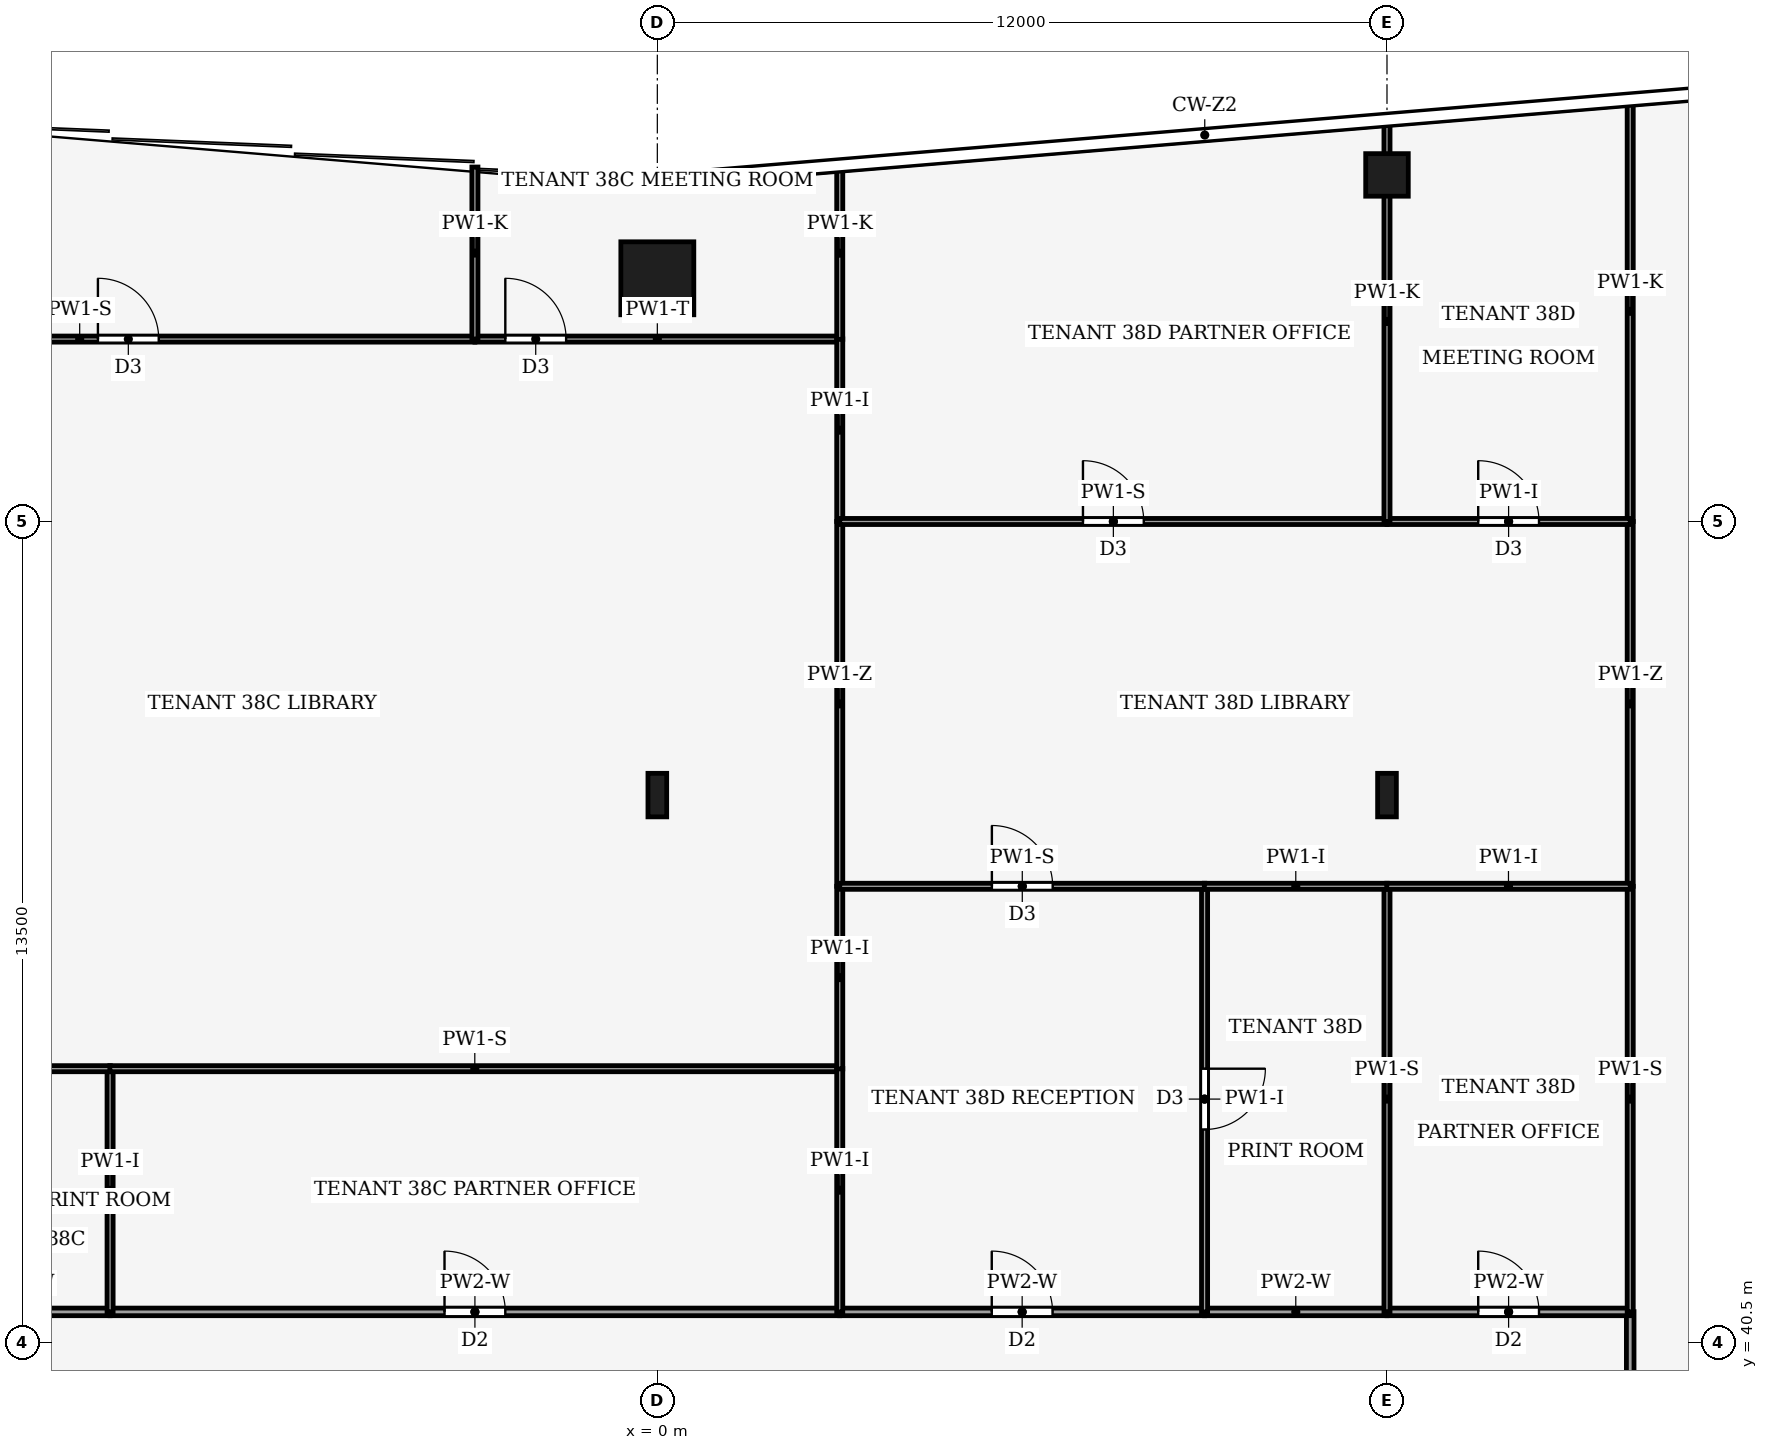
"""IFC4 building model, lengths in metres.
Left out: names, types, materials, properties, quantities, classifications, styles, units other than length and angle.
Written with IfcOpenShell. Run it as: python <this file> out.ifc"""

import sys

from ifc_helpers import new_model, si_unit, direction, frame, frame_2d, origin, origin_2d, place, context, subcontext, project, spatial, rectangle, hollow_rectangle, i_section, extrude, element, fill, save


model = new_model("IFC4")
c1 = context("Model", 3, precision=1e-05, world=origin(), true_north=direction((0.0, 1.0)))
c2 = subcontext(c1, "Body", "Model", "MODEL_VIEW")
j1 = project(units=[si_unit("LENGTHUNIT", "METRE"), si_unit("PLANEANGLEUNIT", "RADIAN")], contexts=[c1])
p1 = place(None, origin())
s1 = spatial("IfcSite", under=j1, at=p1, CompositionType="ELEMENT")
p2 = place(p1, origin())
s2 = spatial("IfcBuilding", under=s1, at=p2, CompositionType="ELEMENT")
p3 = place(p2, frame((0.0, 0.0, 166.0)))
s3 = spatial("IfcBuildingStorey", under=s2, at=p3, CompositionType="ELEMENT", Elevation=166.0)
p4 = place(p3, frame((0.0, 58.0, 0.0), z_axis=(0.0, 0.0, 1.0), x_axis=(1.0, 0.0, 0.0)))
e1 = element("IfcColumn", 1, at=p4, inside=s3, PredefinedType="COLUMN", context=c2, shape_type="SweptSolid", body=[
    extrude(hollow_rectangle(XDim=1.2, YDim=1.2, WallThickness=0.07, at=origin_2d()), origin(), (0.0, 0.0, 1.0), 4.0),
])
p5 = place(p3, frame((12.0, 59.7, 0.0), z_axis=(0.0, 0.0, 1.0), x_axis=(1.0, 0.0, 0.0)))
e2 = element("IfcColumn", 2, at=p5, inside=s3, PredefinedType="COLUMN", context=c2, shape_type="SweptSolid", body=[
    extrude(hollow_rectangle(XDim=0.7, YDim=0.7, WallThickness=0.03, at=origin_2d()), origin(), (0.0, 0.0, 1.0), 4.0),
])
for number, where, z_axis, x_axis in (
    (3, (0.0, 49.5, 0.0), (0.0, 0.0, 1.0), (1.0, 0.0, 0.0)),
    (4, (12.0, 49.5, 0.0), (0.0, 0.0, 1.0), (1.0, 0.0, 0.0)),
):
    element("IfcColumn", number, at=place(p3, frame(where, z_axis=z_axis, x_axis=x_axis)), inside=s3, PredefinedType="COLUMN", context=c2, shape_type="SweptSolid", body=[
        extrude(i_section(OverallWidth=0.308, OverallDepth=0.716, WebThickness=0.021, FlangeThickness=0.04, FilletRadius=0.027, at=origin_2d()), origin(), (0.0, 0.0, 1.0), 4.0),
    ])
p6 = place(p3, frame((16.0, 41.004, 0.0), z_axis=(0.0, 0.0, 1.0), x_axis=(0.0, -1.0, 0.0)))
e5 = element("IfcWall", 5, at=p6, inside=s3, PredefinedType="PARTITIONING", context=c2, shape_type="SweptSolid", body=[
    extrude(rectangle(XDim=11.004, YDim=0.125, at=frame_2d((5.502, 0.0))), origin(), (0.0, 0.0, 1.0), 3.02),
])
p7 = place(p6, frame((5.002, 0.0, 0.0)))
e6 = element("IfcOpeningElement", 6, at=p7, cuts=e5, PredefinedType="OPENING", context=c2, shape_type="SweptSolid", body=[
    extrude(rectangle(XDim=1.0, YDim=2.1, at=frame_2d((0.5, 1.05))), frame((0.0, 0.073, 0.0), z_axis=(0.0, -1.0, 0.0), x_axis=(1.0, 0.0, 0.0)), (0.0, 0.0, 1.0), 0.145),
])
p8 = place(p3, frame((-9.0, 41.0, 0.0), z_axis=(0.0, 0.0, 1.0), x_axis=(-1.0, 0.0, 0.0)))
e7 = element("IfcWall", 7, at=p8, inside=s3, PredefinedType="PARTITIONING", context=c2, shape_type="SweptSolid", body=[
    extrude(rectangle(XDim=3.0, YDim=0.125, at=frame_2d((1.5, 0.0))), origin(), (0.0, 0.0, 1.0), 3.32),
])
p9 = place(p3, frame((-9.0, 41.0, 0.0), z_axis=(0.0, 0.0, 1.0), x_axis=(1.0, 0.0, 0.0)))
e8 = element("IfcWall", 8, at=p9, inside=s3, PredefinedType="PARTITIONING", context=c2, shape_type="SweptSolid", body=[
    extrude(rectangle(XDim=12.0, YDim=0.125, at=frame_2d((6.0, 0.0))), origin(), (0.0, 0.0, 1.0), 3.32),
])
p10 = place(p9, frame((5.5, 0.0, 0.0)))
e9 = element("IfcOpeningElement", 9, at=p10, cuts=e8, PredefinedType="OPENING", context=c2, shape_type="SweptSolid", body=[
    extrude(rectangle(XDim=1.0, YDim=2.1, at=frame_2d((0.5, 1.05))), frame((0.0, 0.073, 0.0), z_axis=(0.0, -1.0, 0.0), x_axis=(1.0, 0.0, 0.0)), (0.0, 0.0, 1.0), 0.145),
])
p11 = place(p3, frame((3.0, 41.0, 0.0), z_axis=(0.0, 0.0, 1.0), x_axis=(1.0, 0.0, 0.0)))
e10 = element("IfcWall", 10, at=p11, inside=s3, PredefinedType="PARTITIONING", context=c2, shape_type="SweptSolid", body=[
    extrude(rectangle(XDim=6.0, YDim=0.125, at=frame_2d((3.0, 0.0))), origin(), (0.0, 0.0, 1.0), 3.32),
])
p12 = place(p11, frame((2.5, 0.0, 0.0)))
e11 = element("IfcOpeningElement", 11, at=p12, cuts=e10, PredefinedType="OPENING", context=c2, shape_type="SweptSolid", body=[
    extrude(rectangle(XDim=1.0, YDim=2.1, at=frame_2d((0.5, 1.05))), frame((0.0, 0.073, 0.0), z_axis=(0.0, -1.0, 0.0), x_axis=(1.0, 0.0, 0.0)), (0.0, 0.0, 1.0), 0.145),
])
p13 = place(p3, frame((12.0, 41.0, 0.0), z_axis=(0.0, 0.0, 1.0), x_axis=(-1.0, 0.0, 0.0)))
e12 = element("IfcWall", 12, at=p13, inside=s3, PredefinedType="PARTITIONING", context=c2, shape_type="SweptSolid", body=[
    extrude(rectangle(XDim=3.0, YDim=0.125, at=frame_2d((1.5, 0.0))), origin(), (0.0, 0.0, 1.0), 3.32),
])
p14 = place(p3, frame((12.0, 41.0, 0.0), z_axis=(0.0, 0.0, 1.0), x_axis=(1.0, 0.0, 0.0)))
e13 = element("IfcWall", 13, at=p14, inside=s3, PredefinedType="PARTITIONING", context=c2, shape_type="SweptSolid", body=[
    extrude(rectangle(XDim=4.0, YDim=0.125, at=frame_2d((2.0, 0.0))), origin(), (0.0, 0.0, 1.0), 3.32),
])
p15 = place(p14, frame((1.5, 0.0, 0.0)))
e14 = element("IfcOpeningElement", 14, at=p15, cuts=e13, PredefinedType="OPENING", context=c2, shape_type="SweptSolid", body=[
    extrude(rectangle(XDim=1.0, YDim=2.1, at=frame_2d((0.5, 1.05))), frame((0.0, 0.073, 0.0), z_axis=(0.0, -1.0, 0.0), x_axis=(1.0, 0.0, 0.0)), (0.0, 0.0, 1.0), 0.145),
])
p16 = place(p3, frame((16.0, 48.0, 0.0), z_axis=(0.0, 0.0, 1.0), x_axis=(0.0, -1.0, 0.0)))
e15 = element("IfcWall", 15, at=p16, inside=s3, PredefinedType="PARTITIONING", context=c2, shape_type="SweptSolid", body=[
    extrude(rectangle(XDim=7.0, YDim=0.1, at=frame_2d((3.5, 0.0))), origin(), (0.0, 0.0, 1.0), 3.32),
])
p17 = place(p3, frame((16.0, 54.0, 0.0), z_axis=(0.0, 0.0, 1.0), x_axis=(0.0, -1.0, 0.0)))
e16 = element("IfcWall", 16, at=p17, inside=s3, PredefinedType="PARTITIONING", context=c2, shape_type="SweptSolid", body=[
    extrude(rectangle(XDim=6.0, YDim=0.1, at=frame_2d((3.0, 0.0))), origin(), (0.0, 0.0, 1.0), 3.12),
])
p18 = place(p3, frame((16.0, 60.913, 0.0), z_axis=(0.0, 0.0, 1.0), x_axis=(0.0, -1.0, 0.0)))
e17 = element("IfcWall", 17, at=p18, inside=s3, PredefinedType="PARTITIONING", context=c2, shape_type="SweptSolid", body=[
    extrude(rectangle(XDim=6.913, YDim=0.1, at=frame_2d((3.457, 0.0))), origin(), (0.0, 0.0, 1.0), 2.92),
])
p19 = place(p3, frame((-9.0, 41.0, 0.0), z_axis=(0.0, 0.0, 1.0), x_axis=(0.0, 1.0, 0.0)))
e18 = element("IfcWall", 18, at=p19, inside=s3, PredefinedType="PARTITIONING", context=c2, shape_type="SweptSolid", body=[
    extrude(rectangle(XDim=4.0, YDim=0.1, at=frame_2d((2.0, 0.0))), origin(), (0.0, 0.0, 1.0), 3.75),
])
p20 = place(p3, frame((-8.996, 45.0, 0.0), z_axis=(0.0, 0.0, 1.0), x_axis=(-1.0, 0.0, 0.0)))
e19 = element("IfcWall", 19, at=p20, inside=s3, PredefinedType="PARTITIONING", context=c2, shape_type="SweptSolid", body=[
    extrude(rectangle(XDim=3.008, YDim=0.1, at=frame_2d((1.504, 0.0))), origin(), (0.0, 0.0, 1.0), 3.75),
])
p21 = place(p3, frame((3.0, 45.0, 0.0), z_axis=(0.0, 0.0, 1.0), x_axis=(-1.0, 0.0, 0.0)))
e20 = element("IfcWall", 20, at=p21, inside=s3, PredefinedType="PARTITIONING", context=c2, shape_type="SweptSolid", body=[
    extrude(rectangle(XDim=12.004, YDim=0.1, at=frame_2d((6.002, 0.0))), origin(), (0.0, 0.0, 1.0), 3.32),
])
p22 = place(p3, frame((3.0, 41.0, 0.0), z_axis=(0.0, 0.0, 1.0), x_axis=(0.0, 1.0, 0.0)))
e21 = element("IfcWall", 21, at=p22, inside=s3, PredefinedType="PARTITIONING", context=c2, shape_type="SweptSolid", body=[
    extrude(rectangle(XDim=4.004, YDim=0.1, at=frame_2d((2.002, 0.0))), origin(), (0.0, 0.0, 1.0), 3.75),
])
p23 = place(p3, frame((-16.0, 57.0, 0.0), z_axis=(0.0, 0.0, 1.0), x_axis=(1.0, 0.0, 0.0)))
e22 = element("IfcWall", 22, at=p23, inside=s3, PredefinedType="PARTITIONING", context=c2, shape_type="SweptSolid", body=[
    extrude(rectangle(XDim=13.0, YDim=0.1, at=frame_2d((6.5, 0.0))), origin(), (0.0, 0.0, 1.0), 3.32),
])
p24 = place(p23, frame((6.8, 0.0, 0.0)))
e23 = element("IfcOpeningElement", 23, at=p24, cuts=e22, PredefinedType="OPENING", context=c2, shape_type="SweptSolid", body=[
    extrude(rectangle(XDim=1.0, YDim=2.1, at=frame_2d((0.5, 1.05))), frame((0.0, 0.06, 0.0), z_axis=(0.0, -1.0, 0.0), x_axis=(1.0, 0.0, 0.0)), (0.0, 0.0, 1.0), 0.12),
])
p25 = place(p3, frame((-3.0, 57.0, 0.0), z_axis=(0.0, 0.0, 1.0), x_axis=(1.0, 0.0, 0.0)))
e24 = element("IfcWall", 24, at=p25, inside=s3, PredefinedType="PARTITIONING", context=c2, shape_type="SweptSolid", body=[
    extrude(rectangle(XDim=6.0, YDim=0.1, at=frame_2d((3.0, 0.0))), origin(), (0.0, 0.0, 1.0), 3.36),
])
p26 = place(p25, frame((0.5, 0.0, 0.0)))
e25 = element("IfcOpeningElement", 25, at=p26, cuts=e24, PredefinedType="OPENING", context=c2, shape_type="SweptSolid", body=[
    extrude(rectangle(XDim=1.0, YDim=2.1, at=frame_2d((0.5, 1.05))), frame((0.0, 0.06, 0.0), z_axis=(0.0, -1.0, 0.0), x_axis=(1.0, 0.0, 0.0)), (0.0, 0.0, 1.0), 0.12),
])
p27 = place(p3, frame((3.0, 44.996, 0.0), z_axis=(0.0, 0.0, 1.0), x_axis=(0.0, 1.0, 0.0)))
e26 = element("IfcWall", 26, at=p27, inside=s3, PredefinedType="PARTITIONING", context=c2, shape_type="SweptSolid", body=[
    extrude(rectangle(XDim=3.004, YDim=0.1, at=frame_2d((1.502, 0.0))), origin(), (0.0, 0.0, 1.0), 3.75),
])
p28 = place(p3, frame((3.0, 48.0, 0.0), z_axis=(0.0, 0.0, 1.0), x_axis=(0.0, 1.0, 0.0)))
e27 = element("IfcWall", 27, at=p28, inside=s3, PredefinedType="PARTITIONING", context=c2, shape_type="SweptSolid", body=[
    extrude(rectangle(XDim=6.0, YDim=0.1, at=frame_2d((3.0, 0.0))), origin(), (0.0, 0.0, 1.0), 3.12),
])
p29 = place(p3, frame((3.0, 54.0, 0.0), z_axis=(0.0, 0.0, 1.0), x_axis=(0.0, 1.0, 0.0)))
e28 = element("IfcWall", 28, at=p29, inside=s3, PredefinedType="PARTITIONING", context=c2, shape_type="SweptSolid", body=[
    extrude(rectangle(XDim=3.004, YDim=0.1, at=frame_2d((1.502, 0.0))), origin(), (0.0, 0.0, 1.0), 3.75),
])
p30 = place(p3, frame((-3.0, 57.0, 0.0), z_axis=(0.0, 0.0, 1.0), x_axis=(0.0, 1.0, 0.0)))
e29 = element("IfcWall", 29, at=p30, inside=s3, PredefinedType="PARTITIONING", context=c2, shape_type="SweptSolid", body=[
    extrude(rectangle(XDim=2.83, YDim=0.1, at=frame_2d((1.415, 0.0))), origin(), (0.0, 0.0, 1.0), 2.92),
])
p31 = place(p3, frame((3.0, 56.996, 0.0), z_axis=(0.0, 0.0, 1.0), x_axis=(0.0, 1.0, 0.0)))
e30 = element("IfcWall", 30, at=p31, inside=s3, PredefinedType="PARTITIONING", context=c2, shape_type="SweptSolid", body=[
    extrude(rectangle(XDim=2.834, YDim=0.1, at=frame_2d((1.417, 0.0))), origin(), (0.0, 0.0, 1.0), 2.92),
])
p32 = place(p3, frame((9.0, 48.0, 0.0), z_axis=(0.0, 0.0, 1.0), x_axis=(0.0, -1.0, 0.0)))
e31 = element("IfcWall", 31, at=p32, inside=s3, PredefinedType="PARTITIONING", context=c2, shape_type="SweptSolid", body=[
    extrude(rectangle(XDim=7.0, YDim=0.1, at=frame_2d((3.5, 0.0))), origin(), (0.0, 0.0, 1.0), 3.75),
])
p33 = place(p32, frame((3.0, 0.0, 0.0)))
e32 = element("IfcOpeningElement", 32, at=p33, cuts=e31, PredefinedType="OPENING", context=c2, shape_type="SweptSolid", body=[
    extrude(rectangle(XDim=1.0, YDim=2.1, at=frame_2d((0.5, 1.05))), frame((0.0, 0.06, 0.0), z_axis=(0.0, -1.0, 0.0), x_axis=(1.0, 0.0, 0.0)), (0.0, 0.0, 1.0), 0.12),
])
p34 = place(p3, frame((3.0, 48.0, 0.0), z_axis=(0.0, 0.0, 1.0), x_axis=(1.0, 0.0, 0.0)))
e33 = element("IfcWall", 33, at=p34, inside=s3, PredefinedType="PARTITIONING", context=c2, shape_type="SweptSolid", body=[
    extrude(rectangle(XDim=6.004, YDim=0.1, at=frame_2d((3.002, 0.0))), origin(), (0.0, 0.0, 1.0), 3.32),
])
p35 = place(p34, frame((2.502, 0.0, 0.0)))
e34 = element("IfcOpeningElement", 34, at=p35, cuts=e33, PredefinedType="OPENING", context=c2, shape_type="SweptSolid", body=[
    extrude(rectangle(XDim=1.0, YDim=2.1, at=frame_2d((0.5, 1.05))), frame((0.0, 0.06, 0.0), z_axis=(0.0, -1.0, 0.0), x_axis=(1.0, 0.0, 0.0)), (0.0, 0.0, 1.0), 0.12),
])
p36 = place(p3, frame((12.0, 41.0, 0.0), z_axis=(0.0, 0.0, 1.0), x_axis=(0.0, 1.0, 0.0)))
e35 = element("IfcWall", 35, at=p36, inside=s3, PredefinedType="PARTITIONING", context=c2, shape_type="SweptSolid", body=[
    extrude(rectangle(XDim=7.0, YDim=0.1, at=frame_2d((3.5, 0.0))), origin(), (0.0, 0.0, 1.0), 3.32),
])
p37 = place(p3, frame((12.004, 48.0, 0.0), z_axis=(0.0, 0.0, 1.0), x_axis=(-1.0, 0.0, 0.0)))
e36 = element("IfcWall", 36, at=p37, inside=s3, PredefinedType="PARTITIONING", context=c2, shape_type="SweptSolid", body=[
    extrude(rectangle(XDim=3.008, YDim=0.1, at=frame_2d((1.504, 0.0))), origin(), (0.0, 0.0, 1.0), 3.75),
])
p38 = place(p3, frame((16.0, 48.0, 0.0), z_axis=(0.0, 0.0, 1.0), x_axis=(-1.0, 0.0, 0.0)))
e37 = element("IfcWall", 37, at=p38, inside=s3, PredefinedType="PARTITIONING", context=c2, shape_type="SweptSolid", body=[
    extrude(rectangle(XDim=4.004, YDim=0.1, at=frame_2d((2.002, 0.0))), origin(), (0.0, 0.0, 1.0), 3.75),
])
p39 = place(p3, frame((3.0, 54.0, 0.0), z_axis=(0.0, 0.0, 1.0), x_axis=(1.0, 0.0, 0.0)))
e38 = element("IfcWall", 38, at=p39, inside=s3, PredefinedType="PARTITIONING", context=c2, shape_type="SweptSolid", body=[
    extrude(rectangle(XDim=9.0, YDim=0.1, at=frame_2d((4.5, 0.0))), origin(), (0.0, 0.0, 1.0), 3.32),
])
p40 = place(p39, frame((4.0, 0.0, 0.0)))
e39 = element("IfcOpeningElement", 39, at=p40, cuts=e38, PredefinedType="OPENING", context=c2, shape_type="SweptSolid", body=[
    extrude(rectangle(XDim=1.0, YDim=2.1, at=frame_2d((0.5, 1.05))), frame((0.0, 0.06, 0.0), z_axis=(0.0, -1.0, 0.0), x_axis=(1.0, 0.0, 0.0)), (0.0, 0.0, 1.0), 0.12),
])
p41 = place(p3, frame((12.0, 54.0, 0.0), z_axis=(0.0, 0.0, 1.0), x_axis=(1.0, 0.0, 0.0)))
e40 = element("IfcWall", 40, at=p41, inside=s3, PredefinedType="PARTITIONING", context=c2, shape_type="SweptSolid", body=[
    extrude(rectangle(XDim=4.0, YDim=0.1, at=frame_2d((2.0, 0.0))), origin(), (0.0, 0.0, 1.0), 3.75),
])
p42 = place(p41, frame((1.5, 0.0, 0.0)))
e41 = element("IfcOpeningElement", 41, at=p42, cuts=e40, PredefinedType="OPENING", context=c2, shape_type="SweptSolid", body=[
    extrude(rectangle(XDim=1.0, YDim=2.1, at=frame_2d((0.5, 1.05))), frame((0.0, 0.06, 0.0), z_axis=(0.0, -1.0, 0.0), x_axis=(1.0, 0.0, 0.0)), (0.0, 0.0, 1.0), 0.12),
])
p43 = place(p3, frame((12.0, 54.0, 0.0), z_axis=(0.0, 0.0, 1.0), x_axis=(0.0, 1.0, 0.0)))
e42 = element("IfcWall", 42, at=p43, inside=s3, PredefinedType="PARTITIONING", context=c2, shape_type="SweptSolid", body=[
    extrude(rectangle(XDim=6.58, YDim=0.1, at=frame_2d((3.29, 0.0))), origin(), (0.0, 0.0, 1.0), 2.92),
])
p44 = place(p10, origin())
e43 = element("IfcDoor", 43, at=p44, inside=s3, OperationType="SINGLE_SWING_RIGHT", PredefinedType="DOOR", context=c2, shape_type="SweptSolid", body=[
    extrude(rectangle(XDim=1.0, YDim=2.1, at=frame_2d((0.5, 1.05))), frame((0.0, 0.025, 0.0), z_axis=(0.0, -1.0, 0.0), x_axis=(1.0, 0.0, 0.0)), (0.0, 0.0, 1.0), 0.05),
])
fill(e9, e43)
p45 = place(p12, origin())
e44 = element("IfcDoor", 44, at=p45, inside=s3, OperationType="SINGLE_SWING_LEFT", PredefinedType="DOOR", context=c2, shape_type="SweptSolid", body=[
    extrude(rectangle(XDim=1.0, YDim=2.1, at=frame_2d((0.5, 1.05))), frame((0.0, 0.025, 0.0), z_axis=(0.0, -1.0, 0.0), x_axis=(1.0, 0.0, 0.0)), (0.0, 0.0, 1.0), 0.05),
])
fill(e11, e44)
p46 = place(p15, origin())
e45 = element("IfcDoor", 45, at=p46, inside=s3, OperationType="SINGLE_SWING_RIGHT", PredefinedType="DOOR", context=c2, shape_type="SweptSolid", body=[
    extrude(rectangle(XDim=1.0, YDim=2.1, at=frame_2d((0.5, 1.05))), frame((0.0, 0.025, 0.0), z_axis=(0.0, -1.0, 0.0), x_axis=(1.0, 0.0, 0.0)), (0.0, 0.0, 1.0), 0.05),
])
fill(e14, e45)
p47 = place(p24, origin())
e46 = element("IfcDoor", 46, at=p47, inside=s3, OperationType="SINGLE_SWING_RIGHT", PredefinedType="DOOR", context=c2, shape_type="SweptSolid", body=[
    extrude(rectangle(XDim=1.0, YDim=2.1, at=frame_2d((0.5, 1.05))), frame((0.0, 0.025, 0.0), z_axis=(0.0, -1.0, 0.0), x_axis=(1.0, 0.0, 0.0)), (0.0, 0.0, 1.0), 0.05),
])
fill(e23, e46)
p48 = place(p26, origin())
e47 = element("IfcDoor", 47, at=p48, inside=s3, OperationType="SINGLE_SWING_LEFT", PredefinedType="DOOR", context=c2, shape_type="SweptSolid", body=[
    extrude(rectangle(XDim=1.0, YDim=2.1, at=frame_2d((0.5, 1.05))), frame((0.0, 0.025, 0.0), z_axis=(0.0, -1.0, 0.0), x_axis=(1.0, 0.0, 0.0)), (0.0, 0.0, 1.0), 0.05),
])
fill(e25, e47)
p49 = place(p33, origin())
e48 = element("IfcDoor", 48, at=p49, inside=s3, OperationType="SINGLE_SWING_LEFT", PredefinedType="DOOR", context=c2, shape_type="SweptSolid", body=[
    extrude(rectangle(XDim=1.0, YDim=2.1, at=frame_2d((0.5, 1.05))), frame((0.0, 0.025, 0.0), z_axis=(0.0, -1.0, 0.0), x_axis=(1.0, 0.0, 0.0)), (0.0, 0.0, 1.0), 0.05),
])
fill(e32, e48)
p50 = place(p35, origin())
e49 = element("IfcDoor", 49, at=p50, inside=s3, OperationType="SINGLE_SWING_RIGHT", PredefinedType="DOOR", context=c2, shape_type="SweptSolid", body=[
    extrude(rectangle(XDim=1.0, YDim=2.1, at=frame_2d((0.5, 1.05))), frame((0.0, 0.025, 0.0), z_axis=(0.0, -1.0, 0.0), x_axis=(1.0, 0.0, 0.0)), (0.0, 0.0, 1.0), 0.05),
])
fill(e34, e49)
p51 = place(p40, origin())
e50 = element("IfcDoor", 50, at=p51, inside=s3, OperationType="SINGLE_SWING_LEFT", PredefinedType="DOOR", context=c2, shape_type="SweptSolid", body=[
    extrude(rectangle(XDim=1.0, YDim=2.1, at=frame_2d((0.5, 1.05))), frame((0.0, 0.025, 0.0), z_axis=(0.0, -1.0, 0.0), x_axis=(1.0, 0.0, 0.0)), (0.0, 0.0, 1.0), 0.05),
])
fill(e39, e50)
p52 = place(p42, origin())
e51 = element("IfcDoor", 51, at=p52, inside=s3, OperationType="SINGLE_SWING_RIGHT", PredefinedType="DOOR", context=c2, shape_type="SweptSolid", body=[
    extrude(rectangle(XDim=1.0, YDim=2.1, at=frame_2d((0.5, 1.05))), frame((0.0, 0.025, 0.0), z_axis=(0.0, -1.0, 0.0), x_axis=(1.0, 0.0, 0.0)), (0.0, 0.0, 1.0), 0.05),
])
fill(e41, e51)
save(model, sys.argv[1])
